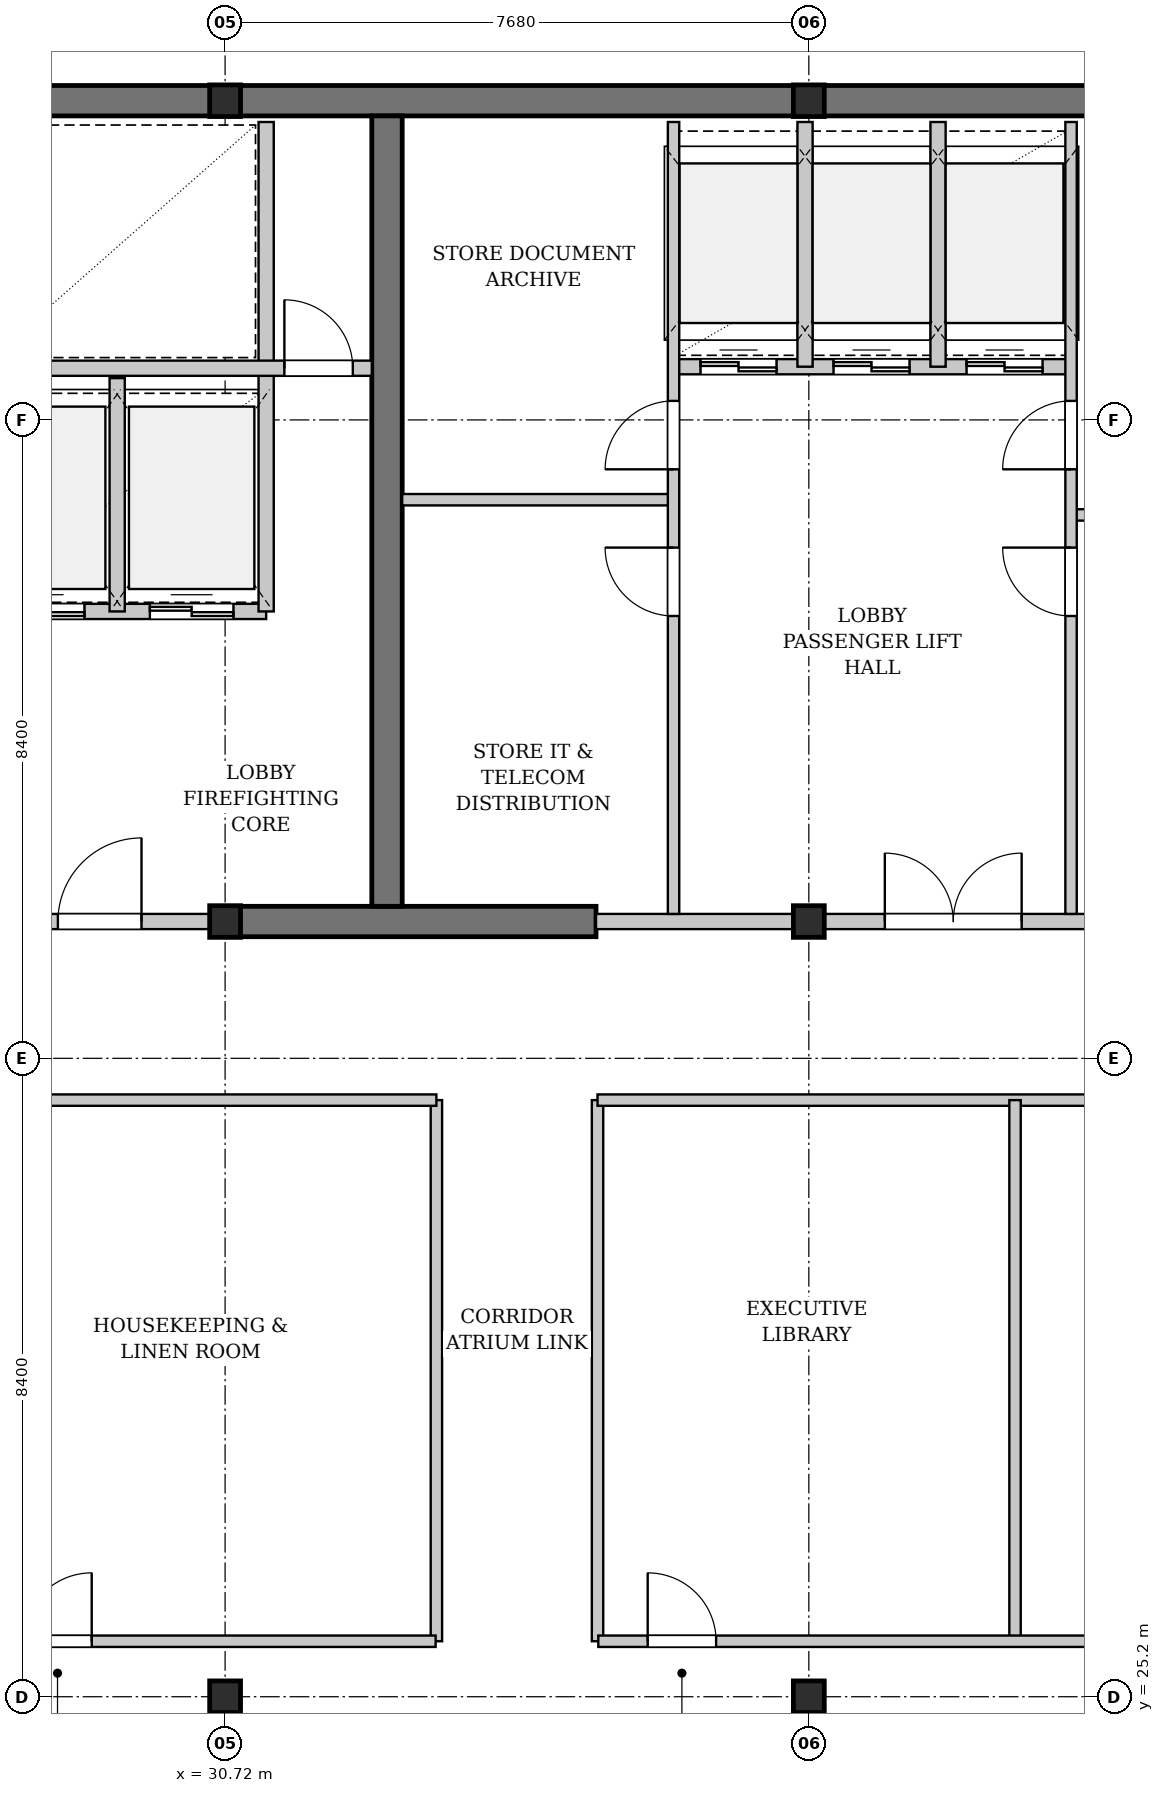
"""IFC4 building model, lengths in metres.
Left out: names, types, materials, properties, quantities, classifications, styles, units other than length and angle.
Written with IfcOpenShell. Run it as: python <this file> out.ifc"""

import sys

from ifc_helpers import new_model, si_unit, direction, frame, frame_2d, origin, origin_2d, place, context, subcontext, project, spatial, rectangle, i_section, extrude, element, fill, save


model = new_model("IFC4")
c1 = context("Model", 3, precision=1e-05, world=origin(), true_north=direction((0.0, 1.0)))
c2 = subcontext(c1, "Body", "Model", "MODEL_VIEW")
j1 = project(units=[si_unit("LENGTHUNIT", "METRE"), si_unit("PLANEANGLEUNIT", "RADIAN")], contexts=[c1])
p1 = place(None, origin())
s1 = spatial("IfcSite", under=j1, at=p1, CompositionType="ELEMENT")
p2 = place(p1, origin())
s2 = spatial("IfcBuilding", under=s1, at=p2, CompositionType="ELEMENT")
p3 = place(p2, frame((0.0, 0.0, 282.9)))
s3 = spatial("IfcBuildingStorey", under=s2, at=p3, CompositionType="ELEMENT", Elevation=282.9)
p4 = place(p3, frame((22.84, 46.2, 0.0), z_axis=(0.0, 0.0, 1.0), x_axis=(1.0, 0.0, 0.0)))
e1 = element("IfcWall", 1, at=p4, inside=s3, PredefinedType="SHEAR", context=c2, shape_type="SweptSolid", body=[
    extrude(rectangle(XDim=31.12, YDim=0.4, at=frame_2d((15.56, 0.0))), origin(), (0.0, 0.0, 1.0), 3.18),
])
p5 = place(p3, frame((30.72, 35.4, 0.0), z_axis=(0.0, 0.0, 1.0), x_axis=(1.0, 0.0, 0.0)))
e2 = element("IfcWall", 2, at=p5, inside=s3, PredefinedType="SHEAR", context=c2, shape_type="SweptSolid", body=[
    extrude(rectangle(XDim=4.88, YDim=0.4, at=frame_2d((2.44, 0.0))), origin(), (0.0, 0.0, 1.0), 3.18),
])
p6 = place(p3, frame((32.85, 35.6, 0.0), z_axis=(0.0, 0.0, 1.0), x_axis=(0.0, 1.0, 0.0)))
e3 = element("IfcWall", 3, at=p6, inside=s3, PredefinedType="SHEAR", context=c2, shape_type="SweptSolid", body=[
    extrude(rectangle(XDim=10.4, YDim=0.4, at=frame_2d((5.2, 0.0))), origin(), (0.0, 0.0, 1.0), 3.18),
])
for number, where, z_axis, x_axis in (
    (4, (30.72, 35.4, 0.0), (0.0, 0.0, 1.0), (1.0, 0.0, 0.0)),
    (5, (30.72, 46.2, 0.0), (0.0, 0.0, 1.0), (1.0, 0.0, 0.0)),
    (6, (30.72, 25.2, 0.0), (0.0, 0.0, 1.0), (1.0, 0.0, 0.0)),
    (7, (38.4, 35.4, 0.0), (0.0, 0.0, 1.0), (1.0, 0.0, 0.0)),
    (8, (38.4, 46.2, 0.0), (0.0, 0.0, 1.0), (1.0, 0.0, 0.0)),
    (9, (38.4, 25.2, 0.0), (0.0, 0.0, 1.0), (1.0, 0.0, 0.0)),
):
    element("IfcColumn", number, at=place(p3, frame(where, z_axis=z_axis, x_axis=x_axis)), inside=s3, PredefinedType="COLUMN", context=c2, shape_type="SweptSolid", body=[
        extrude(i_section(OverallWidth=0.406, OverallDepth=0.416, WebThickness=0.03, FlangeThickness=0.048, FilletRadius=0.015, at=origin_2d()), origin(), (0.0, 0.0, 1.0), 3.4),
    ])
p7 = place(p3, frame((28.22, 35.4, 0.0), z_axis=(0.0, 0.0, 1.0), x_axis=(1.0, 0.0, 0.0)))
e10 = element("IfcWall", 10, at=p7, inside=s3, PredefinedType="PARTITIONING", context=c2, shape_type="SweptSolid", body=[
    extrude(rectangle(XDim=2.5, YDim=0.2, at=frame_2d((1.25, 0.0))), origin(), (0.0, 0.0, 1.0), 2.575),
])
p8 = place(p7, frame((0.3, 0.0, 0.0)))
e11 = element("IfcOpeningElement", 11, at=p8, cuts=e10, PredefinedType="OPENING", context=c2, shape_type="SweptSolid", body=[
    extrude(rectangle(XDim=1.1, YDim=2.15, at=frame_2d((0.55, 1.075))), frame((0.0, 0.11, 0.0), z_axis=(0.0, -1.0, 0.0), x_axis=(1.0, 0.0, 0.0)), (0.0, 0.0, 1.0), 0.22),
])
p9 = place(p3, frame((27.32, 39.48, 0.0), z_axis=(0.0, 0.0, 1.0), x_axis=(1.0, 0.0, 0.0)))
e12 = element("IfcWall", 12, at=p9, inside=s3, PredefinedType="PARTITIONING", context=c2, shape_type="SweptSolid", body=[
    extrude(rectangle(XDim=3.94, YDim=0.2, at=frame_2d((1.97, 0.0))), origin(), (0.0, 0.0, 1.0), 3.18),
])
p10 = place(p9, frame((0.45, 0.0, 0.0)))
e13 = element("IfcOpeningElement", 13, at=p10, cuts=e12, PredefinedType="OPENING", context=c2, shape_type="SweptSolid", body=[
    extrude(rectangle(XDim=1.1, YDim=2.2, at=frame_2d((0.55, 1.1))), frame((0.0, 0.11, 0.0), z_axis=(0.0, -1.0, 0.0), x_axis=(1.0, 0.0, 0.0)), (0.0, 0.0, 1.0), 0.22),
])
p11 = place(p9, frame((2.41, 0.0, 0.0)))
e14 = element("IfcOpeningElement", 14, at=p11, cuts=e12, PredefinedType="OPENING", context=c2, shape_type="SweptSolid", body=[
    extrude(rectangle(XDim=1.1, YDim=2.2, at=frame_2d((0.55, 1.1))), frame((0.0, 0.11, 0.0), z_axis=(0.0, -1.0, 0.0), x_axis=(1.0, 0.0, 0.0)), (0.0, 0.0, 1.0), 0.22),
])
p12 = place(p3, frame((29.3, 39.48, 0.0), z_axis=(0.0, 0.0, 1.0), x_axis=(0.0, 1.0, 0.0)))
e15 = element("IfcWall", 15, at=p12, inside=s3, PredefinedType="PARTITIONING", context=c2, shape_type="SweptSolid", body=[
    extrude(rectangle(XDim=3.07, YDim=0.2, at=frame_2d((1.535, 0.0))), origin(), (0.0, 0.0, 1.0), 3.18),
])
p13 = place(p3, frame((31.26, 39.48, 0.0), z_axis=(0.0, 0.0, 1.0), x_axis=(0.0, 1.0, 0.0)))
e16 = element("IfcWall", 16, at=p13, inside=s3, PredefinedType="PARTITIONING", context=c2, shape_type="SweptSolid", body=[
    extrude(rectangle(XDim=6.44, YDim=0.2, at=frame_2d((3.22, 0.0))), origin(), (0.0, 0.0, 1.0), 3.18),
])
p14 = place(p3, frame((27.32, 42.68, 0.0), z_axis=(0.0, 0.0, 1.0), x_axis=(1.0, 0.0, 0.0)))
e17 = element("IfcWall", 17, at=p14, inside=s3, PredefinedType="PARTITIONING", context=c2, shape_type="SweptSolid", body=[
    extrude(rectangle(XDim=5.33, YDim=0.2, at=frame_2d((2.665, 0.0))), origin(), (0.0, 0.0, 1.0), 3.18),
])
p15 = place(p14, frame((4.18, 0.0, 0.0)))
e18 = element("IfcOpeningElement", 18, at=p15, cuts=e17, PredefinedType="OPENING", context=c2, shape_type="SweptSolid", body=[
    extrude(rectangle(XDim=0.9, YDim=2.15, at=frame_2d((0.45, 1.075))), frame((0.0, 0.11, 0.0), z_axis=(0.0, -1.0, 0.0), x_axis=(1.0, 0.0, 0.0)), (0.0, 0.0, 1.0), 0.22),
])
p16 = place(p3, frame((35.6, 35.4, 0.0), z_axis=(0.0, 0.0, 1.0), x_axis=(1.0, 0.0, 0.0)))
e19 = element("IfcWall", 19, at=p16, inside=s3, PredefinedType="PARTITIONING", context=c2, shape_type="SweptSolid", body=[
    extrude(rectangle(XDim=6.5, YDim=0.2, at=frame_2d((3.25, 0.0))), origin(), (0.0, 0.0, 1.0), 2.575),
])
p17 = place(p16, frame((3.8, 0.0, 0.0)))
e20 = element("IfcOpeningElement", 20, at=p17, cuts=e19, PredefinedType="OPENING", context=c2, shape_type="SweptSolid", body=[
    extrude(rectangle(XDim=1.8, YDim=2.3, at=frame_2d((0.9, 1.15))), frame((0.0, 0.11, 0.0), z_axis=(0.0, -1.0, 0.0), x_axis=(1.0, 0.0, 0.0)), (0.0, 0.0, 1.0), 0.22),
])
p18 = place(p3, frame((36.6, 42.7, 0.0), z_axis=(0.0, 0.0, 1.0), x_axis=(1.0, 0.0, 0.0)))
e21 = element("IfcWall", 21, at=p18, inside=s3, PredefinedType="PARTITIONING", context=c2, shape_type="SweptSolid", body=[
    extrude(rectangle(XDim=5.25, YDim=0.2, at=frame_2d((2.625, 0.0))), origin(), (0.0, 0.0, 1.0), 3.18),
])
p19 = place(p18, frame((0.375, 0.0, 0.0)))
e22 = element("IfcOpeningElement", 22, at=p19, cuts=e21, PredefinedType="OPENING", context=c2, shape_type="SweptSolid", body=[
    extrude(rectangle(XDim=1.0, YDim=2.2, at=frame_2d((0.5, 1.1))), frame((0.0, 0.11, 0.0), z_axis=(0.0, -1.0, 0.0), x_axis=(1.0, 0.0, 0.0)), (0.0, 0.0, 1.0), 0.22),
])
p20 = place(p18, frame((2.125, 0.0, 0.0)))
e23 = element("IfcOpeningElement", 23, at=p20, cuts=e21, PredefinedType="OPENING", context=c2, shape_type="SweptSolid", body=[
    extrude(rectangle(XDim=1.0, YDim=2.2, at=frame_2d((0.5, 1.1))), frame((0.0, 0.11, 0.0), z_axis=(0.0, -1.0, 0.0), x_axis=(1.0, 0.0, 0.0)), (0.0, 0.0, 1.0), 0.22),
])
p21 = place(p18, frame((3.875, 0.0, 0.0)))
e24 = element("IfcOpeningElement", 24, at=p21, cuts=e21, PredefinedType="OPENING", context=c2, shape_type="SweptSolid", body=[
    extrude(rectangle(XDim=1.0, YDim=2.2, at=frame_2d((0.5, 1.1))), frame((0.0, 0.11, 0.0), z_axis=(0.0, -1.0, 0.0), x_axis=(1.0, 0.0, 0.0)), (0.0, 0.0, 1.0), 0.22),
])
p22 = place(p3, frame((38.35, 42.7, 0.0), z_axis=(0.0, 0.0, 1.0), x_axis=(0.0, 1.0, 0.0)))
e25 = element("IfcWall", 25, at=p22, inside=s3, PredefinedType="PARTITIONING", context=c2, shape_type="SweptSolid", body=[
    extrude(rectangle(XDim=3.22, YDim=0.2, at=frame_2d((1.61, 0.0))), origin(), (0.0, 0.0, 1.0), 2.575),
])
p23 = place(p3, frame((40.1, 42.7, 0.0), z_axis=(0.0, 0.0, 1.0), x_axis=(0.0, 1.0, 0.0)))
e26 = element("IfcWall", 26, at=p23, inside=s3, PredefinedType="PARTITIONING", context=c2, shape_type="SweptSolid", body=[
    extrude(rectangle(XDim=3.22, YDim=0.2, at=frame_2d((1.61, 0.0))), origin(), (0.0, 0.0, 1.0), 3.18),
])
p24 = place(p3, frame((33.05, 40.95, 0.0), z_axis=(0.0, 0.0, 1.0), x_axis=(1.0, 0.0, 0.0)))
e27 = element("IfcWall", 27, at=p24, inside=s3, PredefinedType="PARTITIONING", context=c2, shape_type="SweptSolid", body=[
    extrude(rectangle(XDim=3.57, YDim=0.15, at=frame_2d((1.785, 0.0))), origin(), (0.0, 0.0, 1.0), 3.18),
])
p25 = place(p3, frame((36.62, 35.5, 0.0), z_axis=(0.0, 0.0, 1.0), x_axis=(0.0, 1.0, 0.0)))
e28 = element("IfcWall", 28, at=p25, inside=s3, PredefinedType="PARTITIONING", context=c2, shape_type="SweptSolid", body=[
    extrude(rectangle(XDim=10.42, YDim=0.15, at=frame_2d((5.21, 0.0))), origin(), (0.0, 0.0, 1.0), 3.18),
])
p26 = place(p25, frame((3.92, 0.0, 0.0)))
e29 = element("IfcOpeningElement", 29, at=p26, cuts=e28, PredefinedType="OPENING", context=c2, shape_type="SweptSolid", body=[
    extrude(rectangle(XDim=0.9, YDim=2.15, at=frame_2d((0.45, 1.075))), frame((0.0, 0.085, 0.0), z_axis=(0.0, -1.0, 0.0), x_axis=(1.0, 0.0, 0.0)), (0.0, 0.0, 1.0), 0.17),
])
p27 = place(p25, frame((5.85, 0.0, 0.0)))
e30 = element("IfcOpeningElement", 30, at=p27, cuts=e28, PredefinedType="OPENING", context=c2, shape_type="SweptSolid", body=[
    extrude(rectangle(XDim=0.9, YDim=2.15, at=frame_2d((0.45, 1.075))), frame((0.0, 0.085, 0.0), z_axis=(0.0, -1.0, 0.0), x_axis=(1.0, 0.0, 0.0)), (0.0, 0.0, 1.0), 0.17),
])
p28 = place(p3, frame((41.85, 40.75, 0.0), z_axis=(0.0, 0.0, 1.0), x_axis=(1.0, 0.0, 0.0)))
e31 = element("IfcWall", 31, at=p28, inside=s3, PredefinedType="PARTITIONING", context=c2, shape_type="SweptSolid", body=[
    extrude(rectangle(XDim=3.37, YDim=0.15, at=frame_2d((1.685, 0.0))), origin(), (0.0, 0.0, 1.0), 3.18),
])
p29 = place(p3, frame((41.85, 35.5, 0.0), z_axis=(0.0, 0.0, 1.0), x_axis=(0.0, 1.0, 0.0)))
e32 = element("IfcWall", 32, at=p29, inside=s3, PredefinedType="PARTITIONING", context=c2, shape_type="SweptSolid", body=[
    extrude(rectangle(XDim=10.42, YDim=0.15, at=frame_2d((5.21, 0.0))), origin(), (0.0, 0.0, 1.0), 3.18),
])
p30 = place(p29, frame((3.92, 0.0, 0.0)))
e33 = element("IfcOpeningElement", 33, at=p30, cuts=e32, PredefinedType="OPENING", context=c2, shape_type="SweptSolid", body=[
    extrude(rectangle(XDim=0.9, YDim=2.15, at=frame_2d((0.45, 1.075))), frame((0.0, 0.085, 0.0), z_axis=(0.0, -1.0, 0.0), x_axis=(1.0, 0.0, 0.0)), (0.0, 0.0, 1.0), 0.17),
])
p31 = place(p29, frame((5.85, 0.0, 0.0)))
e34 = element("IfcOpeningElement", 34, at=p31, cuts=e32, PredefinedType="OPENING", context=c2, shape_type="SweptSolid", body=[
    extrude(rectangle(XDim=0.9, YDim=2.15, at=frame_2d((0.45, 1.075))), frame((0.0, 0.085, 0.0), z_axis=(0.0, -1.0, 0.0), x_axis=(1.0, 0.0, 0.0)), (0.0, 0.0, 1.0), 0.17),
])
for number, where, z_axis, x_axis in (
    (35, (33.5, 25.93, 0.0), (0.0, 0.0, 1.0), (0.0, 1.0, 0.0)),
    (36, (35.62, 25.93, 0.0), (0.0, 0.0, 1.0), (0.0, 1.0, 0.0)),
):
    element("IfcWall", number, at=place(p3, frame(where, z_axis=z_axis, x_axis=x_axis)), inside=s3, PredefinedType="PARTITIONING", context=c2, shape_type="SweptSolid", body=[
        extrude(rectangle(XDim=7.12, YDim=0.15, at=frame_2d((3.56, 0.0))), origin(), (0.0, 0.0, 1.0), 3.18),
    ])
p32 = place(p3, frame((23.52, 33.05, 0.0), z_axis=(0.0, 0.0, 1.0), x_axis=(1.0, 0.0, 0.0)))
e37 = element("IfcWall", 37, at=p32, inside=s3, PredefinedType="PARTITIONING", context=c2, shape_type="SweptSolid", body=[
    extrude(rectangle(XDim=9.98, YDim=0.15, at=frame_2d((4.99, 0.0))), origin(), (0.0, 0.0, 1.0), 3.18),
])
p33 = place(p3, frame((35.62, 33.05, 0.0), z_axis=(0.0, 0.0, 1.0), x_axis=(1.0, 0.0, 0.0)))
e38 = element("IfcWall", 38, at=p33, inside=s3, PredefinedType="PARTITIONING", context=c2, shape_type="SweptSolid", body=[
    extrude(rectangle(XDim=14.46, YDim=0.15, at=frame_2d((7.23, 0.0))), origin(), (0.0, 0.0, 1.0), 3.18),
])
p34 = place(p3, frame((23.54, 25.93, 0.0), z_axis=(0.0, 0.0, 1.0), x_axis=(1.0, 0.0, 0.0)))
e39 = element("IfcWall", 39, at=p34, inside=s3, PredefinedType="PARTITIONING", context=c2, shape_type="SweptSolid", body=[
    extrude(rectangle(XDim=9.95, YDim=0.15, at=frame_2d((4.975, 0.0))), origin(), (0.0, 0.0, 1.0), 3.18),
])
p35 = place(p34, frame((4.525, 0.0, 0.0)))
e40 = element("IfcOpeningElement", 40, at=p35, cuts=e39, PredefinedType="OPENING", context=c2, shape_type="SweptSolid", body=[
    extrude(rectangle(XDim=0.9, YDim=2.15, at=frame_2d((0.45, 1.075))), frame((0.0, 0.085, 0.0), z_axis=(0.0, -1.0, 0.0), x_axis=(1.0, 0.0, 0.0)), (0.0, 0.0, 1.0), 0.17),
])
p36 = place(p3, frame((41.113, 25.93, 0.0), z_axis=(0.0, 0.0, 1.0), x_axis=(0.0, 1.0, 0.0)))
e41 = element("IfcWall", 41, at=p36, inside=s3, PredefinedType="PARTITIONING", context=c2, shape_type="SweptSolid", body=[
    extrude(rectangle(XDim=7.12, YDim=0.15, at=frame_2d((3.56, 0.0))), origin(), (0.0, 0.0, 1.0), 3.18),
])
p37 = place(p3, frame((35.63, 25.93, 0.0), z_axis=(0.0, 0.0, 1.0), x_axis=(1.0, 0.0, 0.0)))
e42 = element("IfcWall", 42, at=p37, inside=s3, PredefinedType="PARTITIONING", context=c2, shape_type="SweptSolid", body=[
    extrude(rectangle(XDim=14.43, YDim=0.15, at=frame_2d((7.215, 0.0))), origin(), (0.0, 0.0, 1.0), 3.18),
])
p38 = place(p37, frame((0.65, 0.0, 0.0)))
e43 = element("IfcOpeningElement", 43, at=p38, cuts=e42, PredefinedType="OPENING", context=c2, shape_type="SweptSolid", body=[
    extrude(rectangle(XDim=0.9, YDim=2.15, at=frame_2d((0.45, 1.075))), frame((0.0, 0.085, 0.0), z_axis=(0.0, -1.0, 0.0), x_axis=(1.0, 0.0, 0.0)), (0.0, 0.0, 1.0), 0.17),
])
p39 = place(p37, frame((8.031, 0.0, 0.0)))
e44 = element("IfcOpeningElement", 44, at=p39, cuts=e42, PredefinedType="OPENING", context=c2, shape_type="SweptSolid", body=[
    extrude(rectangle(XDim=0.9, YDim=2.15, at=frame_2d((0.45, 1.075))), frame((0.0, 0.085, 0.0), z_axis=(0.0, -1.0, 0.0), x_axis=(1.0, 0.0, 0.0)), (0.0, 0.0, 1.0), 0.17),
])
p40 = place(p8, origin())
e45 = element("IfcDoor", 45, at=p40, inside=s3, OperationType="SINGLE_SWING_RIGHT", PredefinedType="DOOR", context=c2, shape_type="SweptSolid", body=[
    extrude(rectangle(XDim=1.1, YDim=2.15, at=frame_2d((0.55, 1.075))), frame((0.0, 0.025, 0.0), z_axis=(0.0, -1.0, 0.0), x_axis=(1.0, 0.0, 0.0)), (0.0, 0.0, 1.0), 0.05),
])
fill(e11, e45)
p41 = place(p10, origin())
e46 = element("IfcDoor", 46, at=p41, inside=s3, OperationType="DOUBLE_DOOR_SLIDING", PredefinedType="DOOR", context=c2, shape_type="SweptSolid", body=[
    extrude(rectangle(XDim=1.1, YDim=2.2, at=frame_2d((0.55, 1.1))), frame((0.0, 0.025, 0.0), z_axis=(0.0, -1.0, 0.0), x_axis=(1.0, 0.0, 0.0)), (0.0, 0.0, 1.0), 0.05),
])
fill(e13, e46)
p42 = place(p11, origin())
e47 = element("IfcDoor", 47, at=p42, inside=s3, OperationType="DOUBLE_DOOR_SLIDING", PredefinedType="DOOR", context=c2, shape_type="SweptSolid", body=[
    extrude(rectangle(XDim=1.1, YDim=2.2, at=frame_2d((0.55, 1.1))), frame((0.0, 0.025, 0.0), z_axis=(0.0, -1.0, 0.0), x_axis=(1.0, 0.0, 0.0)), (0.0, 0.0, 1.0), 0.05),
])
fill(e14, e47)
p43 = place(p15, origin())
e48 = element("IfcDoor", 48, at=p43, inside=s3, OperationType="SINGLE_SWING_LEFT", PredefinedType="DOOR", context=c2, shape_type="SweptSolid", body=[
    extrude(rectangle(XDim=0.9, YDim=2.15, at=frame_2d((0.45, 1.075))), frame((0.0, 0.025, 0.0), z_axis=(0.0, -1.0, 0.0), x_axis=(1.0, 0.0, 0.0)), (0.0, 0.0, 1.0), 0.05),
])
fill(e18, e48)
p44 = place(p17, origin())
e49 = element("IfcDoor", 49, at=p44, inside=s3, OperationType="DOUBLE_DOOR_SINGLE_SWING", PredefinedType="DOOR", context=c2, shape_type="SweptSolid", body=[
    extrude(rectangle(XDim=1.8, YDim=2.3, at=frame_2d((0.9, 1.15))), frame((0.0, 0.025, 0.0), z_axis=(0.0, -1.0, 0.0), x_axis=(1.0, 0.0, 0.0)), (0.0, 0.0, 1.0), 0.05),
])
fill(e20, e49)
p45 = place(p19, origin())
e50 = element("IfcDoor", 50, at=p45, inside=s3, OperationType="DOUBLE_DOOR_SLIDING", PredefinedType="DOOR", context=c2, shape_type="SweptSolid", body=[
    extrude(rectangle(XDim=1.0, YDim=2.2, at=frame_2d((0.5, 1.1))), frame((0.0, 0.025, 0.0), z_axis=(0.0, -1.0, 0.0), x_axis=(1.0, 0.0, 0.0)), (0.0, 0.0, 1.0), 0.05),
])
fill(e22, e50)
p46 = place(p20, origin())
e51 = element("IfcDoor", 51, at=p46, inside=s3, OperationType="DOUBLE_DOOR_SLIDING", PredefinedType="DOOR", context=c2, shape_type="SweptSolid", body=[
    extrude(rectangle(XDim=1.0, YDim=2.2, at=frame_2d((0.5, 1.1))), frame((0.0, 0.025, 0.0), z_axis=(0.0, -1.0, 0.0), x_axis=(1.0, 0.0, 0.0)), (0.0, 0.0, 1.0), 0.05),
])
fill(e23, e51)
p47 = place(p21, origin())
e52 = element("IfcDoor", 52, at=p47, inside=s3, OperationType="DOUBLE_DOOR_SLIDING", PredefinedType="DOOR", context=c2, shape_type="SweptSolid", body=[
    extrude(rectangle(XDim=1.0, YDim=2.2, at=frame_2d((0.5, 1.1))), frame((0.0, 0.025, 0.0), z_axis=(0.0, -1.0, 0.0), x_axis=(1.0, 0.0, 0.0)), (0.0, 0.0, 1.0), 0.05),
])
fill(e24, e52)
p48 = place(p26, origin())
e53 = element("IfcDoor", 53, at=p48, inside=s3, OperationType="SINGLE_SWING_RIGHT", PredefinedType="DOOR", context=c2, shape_type="SweptSolid", body=[
    extrude(rectangle(XDim=0.9, YDim=2.15, at=frame_2d((0.45, 1.075))), frame((0.0, 0.025, 0.0), z_axis=(0.0, -1.0, 0.0), x_axis=(1.0, 0.0, 0.0)), (0.0, 0.0, 1.0), 0.05),
])
fill(e29, e53)
p49 = place(p27, origin())
e54 = element("IfcDoor", 54, at=p49, inside=s3, OperationType="SINGLE_SWING_LEFT", PredefinedType="DOOR", context=c2, shape_type="SweptSolid", body=[
    extrude(rectangle(XDim=0.9, YDim=2.15, at=frame_2d((0.45, 1.075))), frame((0.0, 0.025, 0.0), z_axis=(0.0, -1.0, 0.0), x_axis=(1.0, 0.0, 0.0)), (0.0, 0.0, 1.0), 0.05),
])
fill(e30, e54)
p50 = place(p30, origin())
e55 = element("IfcDoor", 55, at=p50, inside=s3, OperationType="SINGLE_SWING_RIGHT", PredefinedType="DOOR", context=c2, shape_type="SweptSolid", body=[
    extrude(rectangle(XDim=0.9, YDim=2.15, at=frame_2d((0.45, 1.075))), frame((0.0, 0.025, 0.0), z_axis=(0.0, -1.0, 0.0), x_axis=(1.0, 0.0, 0.0)), (0.0, 0.0, 1.0), 0.05),
])
fill(e33, e55)
p51 = place(p31, origin())
e56 = element("IfcDoor", 56, at=p51, inside=s3, OperationType="SINGLE_SWING_LEFT", PredefinedType="DOOR", context=c2, shape_type="SweptSolid", body=[
    extrude(rectangle(XDim=0.9, YDim=2.15, at=frame_2d((0.45, 1.075))), frame((0.0, 0.025, 0.0), z_axis=(0.0, -1.0, 0.0), x_axis=(1.0, 0.0, 0.0)), (0.0, 0.0, 1.0), 0.05),
])
fill(e34, e56)
p52 = place(p35, origin())
e57 = element("IfcDoor", 57, at=p52, inside=s3, OperationType="SINGLE_SWING_RIGHT", PredefinedType="DOOR", context=c2, shape_type="SweptSolid", body=[
    extrude(rectangle(XDim=0.9, YDim=2.15, at=frame_2d((0.45, 1.075))), frame((0.0, 0.025, 0.0), z_axis=(0.0, -1.0, 0.0), x_axis=(1.0, 0.0, 0.0)), (0.0, 0.0, 1.0), 0.05),
])
fill(e40, e57)
p53 = place(p38, origin())
e58 = element("IfcDoor", 58, at=p53, inside=s3, OperationType="SINGLE_SWING_LEFT", PredefinedType="DOOR", context=c2, shape_type="SweptSolid", body=[
    extrude(rectangle(XDim=0.9, YDim=2.15, at=frame_2d((0.45, 1.075))), frame((0.0, 0.025, 0.0), z_axis=(0.0, -1.0, 0.0), x_axis=(1.0, 0.0, 0.0)), (0.0, 0.0, 1.0), 0.05),
])
fill(e43, e58)
save(model, sys.argv[1])
